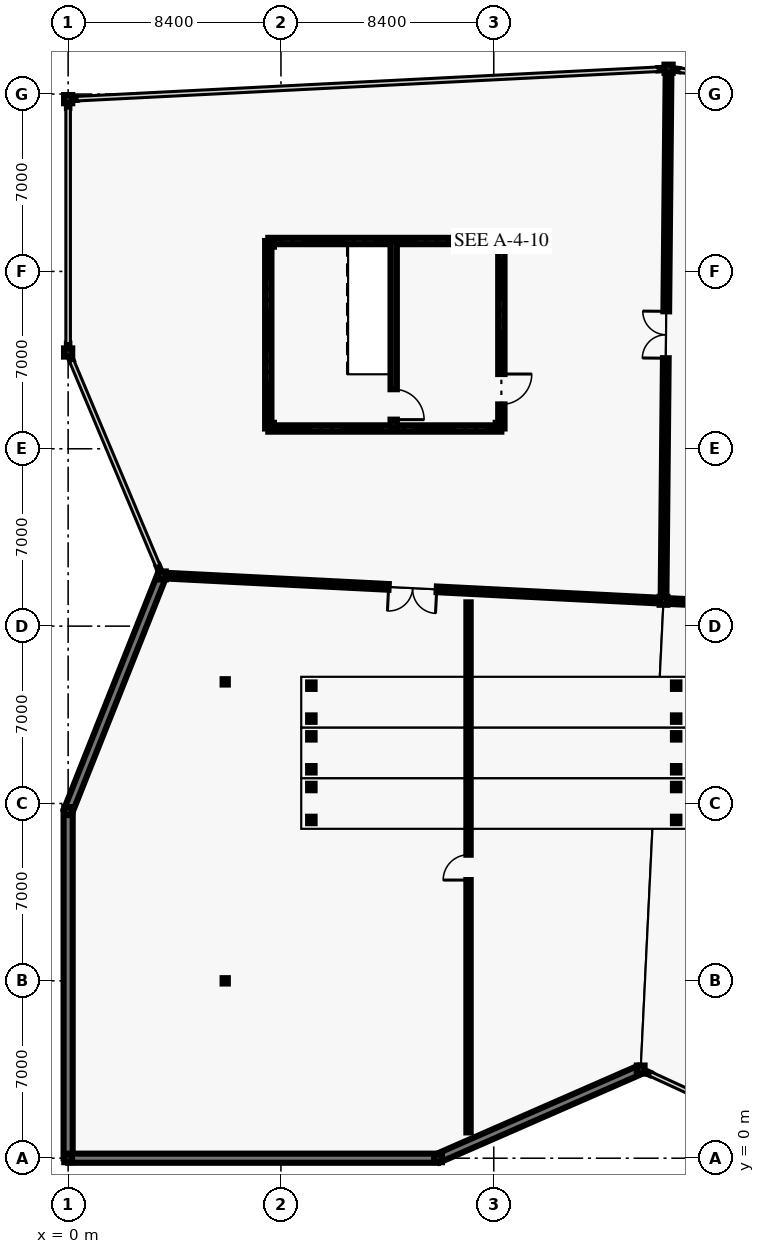
"""IFC4 building model, lengths in metres.
Left out: names, types, materials, properties, quantities, classifications, styles, units other than length and angle.
Written with IfcOpenShell. Run it as: python <this file> out.ifc"""

import sys

from ifc_helpers import new_model, si_unit, direction, frame, frame_2d, origin, origin_2d, place, context, subcontext, project, spatial, rectangle, hollow_circle, i_section, extrude, element, fill, save


model = new_model("IFC4")
c1 = context("Model", 3, precision=1e-05, world=origin(), true_north=direction((0.0, 1.0)))
c2 = subcontext(c1, "Body", "Model", "MODEL_VIEW")
j1 = project(units=[si_unit("LENGTHUNIT", "METRE"), si_unit("PLANEANGLEUNIT", "RADIAN")], contexts=[c1])
p1 = place(None, origin())
s1 = spatial("IfcSite", under=j1, at=p1, CompositionType="ELEMENT")
p2 = place(p1, origin())
s2 = spatial("IfcBuilding", under=s1, at=p2, CompositionType="ELEMENT")
p3 = place(p2, frame((0.0, 0.0, 5.4)))
s3 = spatial("IfcBuildingStorey", under=s2, at=p3, CompositionType="ELEMENT", Elevation=5.4)
for number, where, z_axis, x_axis in (
    (1, (0.0, 0.0, 0.0), (0.0, 0.0, 1.0), (1.0, 0.0, 0.0)),
    (2, (0.0, 13.7, 0.0), (0.0, 0.0, 1.0), (1.0, 0.0, 0.0)),
):
    element("IfcColumn", number, at=place(p3, frame(where, z_axis=z_axis, x_axis=x_axis)), inside=s3, PredefinedType="COLUMN", context=c2, shape_type="SweptSolid", body=[
        extrude(i_section(OverallWidth=0.307, OverallDepth=0.315, WebThickness=0.012, FlangeThickness=0.019, FilletRadius=0.017, at=origin_2d()), origin(), (0.0, 0.0, 1.0), 4.8),
    ])
for number, where, z_axis, x_axis in (
    (3, (0.0, 31.8, 0.0), (0.0, 0.0, 1.0), (1.0, 0.0, 0.0)),
    (4, (0.0, 41.8, 0.0), (0.0, 0.0, 1.0), (1.0, 0.0, 0.0)),
):
    element("IfcColumn", number, at=place(p3, frame(where, z_axis=z_axis, x_axis=x_axis)), inside=s3, PredefinedType="COLUMN", context=c2, shape_type="SweptSolid", body=[
        extrude(hollow_circle(Radius=0.162, WallThickness=0.01, at=origin_2d()), origin(), (0.0, 0.0, 1.0), 4.8),
    ])
for number, where, z_axis, x_axis in (
    (5, (3.7, 23.0, 0.0), (0.0, 0.0, 1.0), (1.0, 0.0, 0.0)),
    (6, (14.6, 0.0, 0.0), (0.0, 0.0, 1.0), (1.0, 0.0, 0.0)),
    (7, (22.6, 3.5, 0.0), (0.0, 0.0, 1.0), (1.0, 0.0, 0.0)),
    (8, (23.5, 22.0, 0.0), (0.0, 0.0, 1.0), (1.0, 0.0, 0.0)),
):
    element("IfcColumn", number, at=place(p3, frame(where, z_axis=z_axis, x_axis=x_axis)), inside=s3, PredefinedType="COLUMN", context=c2, shape_type="SweptSolid", body=[
        extrude(i_section(OverallWidth=0.307, OverallDepth=0.315, WebThickness=0.012, FlangeThickness=0.019, FilletRadius=0.017, at=origin_2d()), origin(), (0.0, 0.0, 1.0), 4.8),
    ])
p4 = place(p3, frame((23.7, 43.0, 0.0), z_axis=(0.0, 0.0, 1.0), x_axis=(1.0, 0.0, 0.0)))
e9 = element("IfcColumn", 9, at=p4, inside=s3, PredefinedType="COLUMN", context=c2, shape_type="SweptSolid", body=[
    extrude(hollow_circle(Radius=0.162, WallThickness=0.01, at=origin_2d()), origin(), (0.0, 0.0, 1.0), 4.8),
])
for number, where, z_axis, x_axis in (
    (10, (8.02, 28.92, 0.0), (0.0, 0.0, 1.0), (1.0, 0.0, 0.0)),
    (11, (16.98, 28.92, 0.0), (0.0, 0.0, 1.0), (1.0, 0.0, 0.0)),
    (12, (16.98, 36.08, 0.0), (0.0, 0.0, 1.0), (1.0, 0.0, 0.0)),
    (13, (8.02, 36.08, 0.0), (0.0, 0.0, 1.0), (1.0, 0.0, 0.0)),
    (14, (6.2, 7.0, 0.0), (0.0, 0.0, 1.0), (1.0, 0.0, 0.0)),
    (15, (6.2, 18.8, 0.0), (0.0, 0.0, 1.0), (1.0, 0.0, 0.0)),
):
    element("IfcColumn", number, at=place(p3, frame(where, z_axis=z_axis, x_axis=x_axis)), inside=s3, PredefinedType="COLUMN", context=c2, shape_type="SweptSolid", body=[
        extrude(i_section(OverallWidth=0.205, OverallDepth=0.21, WebThickness=0.009, FlangeThickness=0.014, FilletRadius=0.01, at=origin_2d()), origin(), (0.0, 0.0, 1.0), 4.8),
    ])
for number, where, z_axis, x_axis in (
    (16, (9.6, 13.35, 0.0), (0.0, 0.0, 1.0), (1.0, 0.0, 0.0)),
    (17, (9.6, 14.65, 0.0), (0.0, 0.0, 1.0), (1.0, 0.0, 0.0)),
    (18, (24.0, 13.35, 0.0), (0.0, 0.0, 1.0), (1.0, 0.0, 0.0)),
    (19, (24.0, 14.65, 0.0), (0.0, 0.0, 1.0), (1.0, 0.0, 0.0)),
):
    element("IfcColumn", number, at=place(p3, frame(where, z_axis=z_axis, x_axis=x_axis)), inside=s3, PredefinedType="COLUMN", context=c2, shape_type="SweptSolid", body=[
        extrude(i_section(OverallWidth=0.254, OverallDepth=0.254, WebThickness=0.009, FlangeThickness=0.014, FilletRadius=0.013, at=origin_2d()), origin(), (0.0, 0.0, 1.0), 0.295),
    ])
for number, where, z_axis, x_axis in (
    (20, (9.6, 15.35, 0.0), (0.0, 0.0, 1.0), (1.0, 0.0, 0.0)),
    (21, (9.6, 16.65, 0.0), (0.0, 0.0, 1.0), (1.0, 0.0, 0.0)),
    (22, (24.0, 15.35, 0.0), (0.0, 0.0, 1.0), (1.0, 0.0, 0.0)),
    (23, (24.0, 16.65, 0.0), (0.0, 0.0, 1.0), (1.0, 0.0, 0.0)),
):
    element("IfcColumn", number, at=place(p3, frame(where, z_axis=z_axis, x_axis=x_axis)), inside=s3, PredefinedType="COLUMN", context=c2, shape_type="SweptSolid", body=[
        extrude(i_section(OverallWidth=0.254, OverallDepth=0.254, WebThickness=0.009, FlangeThickness=0.014, FilletRadius=0.013, at=origin_2d()), origin(), (0.0, 0.0, 1.0), 0.745),
    ])
for number, where, z_axis, x_axis in (
    (24, (9.6, 17.35, 0.0), (0.0, 0.0, 1.0), (1.0, 0.0, 0.0)),
    (25, (9.6, 18.65, 0.0), (0.0, 0.0, 1.0), (1.0, 0.0, 0.0)),
    (26, (24.0, 17.35, 0.0), (0.0, 0.0, 1.0), (1.0, 0.0, 0.0)),
    (27, (24.0, 18.65, 0.0), (0.0, 0.0, 1.0), (1.0, 0.0, 0.0)),
):
    element("IfcColumn", number, at=place(p3, frame(where, z_axis=z_axis, x_axis=x_axis)), inside=s3, PredefinedType="COLUMN", context=c2, shape_type="SweptSolid", body=[
        extrude(i_section(OverallWidth=0.254, OverallDepth=0.254, WebThickness=0.009, FlangeThickness=0.014, FilletRadius=0.013, at=origin_2d()), origin(), (0.0, 0.0, 1.0), 1.195),
    ])
p5 = place(p3, frame((0.0, 13.7, 0.0), z_axis=(0.0, 0.0, 1.0), x_axis=(0.36968498985, 0.929157149399, 0.0)))
e28 = element("IfcWall", 28, at=p5, inside=s3, PredefinedType="SOLIDWALL", context=c2, shape_type="SweptSolid", body=[
    extrude(rectangle(XDim=9.949, YDim=0.36, at=frame_2d((4.975, 0.0))), origin(), (0.0, 0.0, 1.0), 3.62),
])
p6 = place(p3, frame((0.0, 0.0, 0.0), z_axis=(0.0, 0.0, 1.0), x_axis=(0.0, 1.0, 0.0)))
e29 = element("IfcWall", 29, at=p6, inside=s3, PredefinedType="SOLIDWALL", context=c2, shape_type="SweptSolid", body=[
    extrude(rectangle(XDim=13.7, YDim=0.36, at=frame_2d((6.85, 0.0))), origin(), (0.0, 0.0, 1.0), 3.62),
])
p7 = place(p3, frame((14.6, 0.0, 0.0), z_axis=(0.0, 0.0, 1.0), x_axis=(-1.0, 0.0, 0.0)))
e30 = element("IfcWall", 30, at=p7, inside=s3, PredefinedType="SOLIDWALL", context=c2, shape_type="SweptSolid", body=[
    extrude(rectangle(XDim=14.6, YDim=0.36, at=frame_2d((7.3, 0.0))), origin(), (0.0, 0.0, 1.0), 3.62),
])
p8 = place(p3, frame((22.545, 3.476, 0.0), z_axis=(0.0, 0.0, 1.0), x_axis=(-0.916148288852, -0.400839510069, 0.0)))
e31 = element("IfcWall", 31, at=p8, inside=s3, PredefinedType="SOLIDWALL", context=c2, shape_type="SweptSolid", body=[
    extrude(rectangle(XDim=8.672, YDim=0.36, at=frame_2d((4.336, 0.0))), origin(), (0.0, 0.0, 1.0), 3.62),
])
p9 = place(p3, frame((22.972, 3.329, 0.0), z_axis=(0.0, 0.0, 1.0), x_axis=(-0.9095772547, 0.415534857422, 0.0)))
e32 = element("IfcWall", 32, at=p9, inside=s3, PredefinedType="SOLIDWALL", context=c2, shape_type="SweptSolid", body=[
    extrude(rectangle(XDim=0.308, YDim=0.095, at=frame_2d((0.154, 0.0))), origin(), (0.0, 0.0, 1.0), 3.62),
])
p10 = place(p3, frame((0.042, 41.802, 0.0), z_axis=(0.0, 0.0, 1.0), x_axis=(0.998635261606, 0.052226566772, 0.0)))
e33 = element("IfcWall", 33, at=p10, inside=s3, PredefinedType="SOLIDWALL", context=c2, shape_type="SweptSolid", body=[
    extrude(rectangle(XDim=0.309, YDim=0.095, at=frame_2d((0.154, 0.0))), origin(), (0.0, 0.0, 1.0), 3.62),
])
p11 = place(p3, frame((23.29, 42.979, 0.0), z_axis=(0.0, 0.0, 1.0), x_axis=(0.998633100652, 0.052267870454, 0.0)))
e34 = element("IfcWall", 34, at=p11, inside=s3, PredefinedType="SOLIDWALL", context=c2, shape_type="SweptSolid", body=[
    extrude(rectangle(XDim=0.308, YDim=0.095, at=frame_2d((0.154, 0.0))), origin(), (0.0, 0.0, 1.0), 3.62),
])
p12 = place(p3, frame((0.0, 31.842, 0.0), z_axis=(0.0, 0.0, 1.0), x_axis=(0.0, 1.0, 0.0)))
e35 = element("IfcWall", 35, at=p12, inside=s3, PredefinedType="SOLIDWALL", context=c2, shape_type="SweptSolid", body=[
    extrude(rectangle(XDim=0.308, YDim=0.095, at=frame_2d((0.154, 0.0))), origin(), (0.0, 0.0, 1.0), 3.62),
])
for number, where, z_axis, x_axis in (
    (36, (0.0, 41.45, 0.0), (0.0, 0.0, 1.0), (0.0, 1.0, 0.0)),
    (37, (3.661, 23.094, 0.0), (0.0, 0.0, 1.0), (-0.389, 0.921, 0.0)),
    (38, (0.136, 31.477, 0.0), (0.0, 0.0, 1.0), (-0.389, 0.921, 0.0)),
):
    element("IfcWall", number, at=place(p3, frame(where, z_axis=z_axis, x_axis=x_axis)), inside=s3, PredefinedType="SOLIDWALL", context=c2, shape_type="SweptSolid", body=[
        extrude(rectangle(XDim=0.308, YDim=0.095, at=frame_2d((0.154, 0.0))), origin(), (0.0, 0.0, 1.0), 3.62),
    ])
p13 = place(p3, frame((23.802, 42.986, 0.0), z_axis=(0.0, 0.0, 1.0), x_axis=(0.991074779294, -0.133307096014, 0.0)))
e39 = element("IfcWall", 39, at=p13, inside=s3, PredefinedType="SOLIDWALL", context=c2, shape_type="SweptSolid", body=[
    extrude(rectangle(XDim=0.308, YDim=0.095, at=frame_2d((0.154, 0.0))), origin(), (0.0, 0.0, 1.0), 3.62),
])
p14 = place(p3, frame((23.5, 22.0, 0.0), z_axis=(0.0, 0.0, 1.0), x_axis=(-0.99872706092, 0.050440636263, 0.0)))
e40 = element("IfcWall", 40, at=p14, inside=s3, PredefinedType="SOLIDWALL", context=c2, shape_type="SweptSolid", body=[
    extrude(rectangle(XDim=19.825, YDim=0.225, at=frame_2d((9.913, 0.0))), origin(), (0.0, 0.0, 1.0), 4.02),
])
p15 = place(p14, frame((8.963, 0.0, 0.0)))
e41 = element("IfcOpeningElement", 41, at=p15, cuts=e40, PredefinedType="OPENING", context=c2, shape_type="SweptSolid", body=[
    extrude(rectangle(XDim=1.9, YDim=2.35, at=frame_2d((0.95, 1.175))), frame((0.0, 0.123, 0.0), z_axis=(0.0, -1.0, 0.0), x_axis=(1.0, 0.0, 0.0)), (0.0, 0.0, 1.0), 0.245),
])
p16 = place(p3, frame((43.8, 21.0, 0.0), z_axis=(0.0, 0.0, 1.0), x_axis=(-0.998788882418, 0.049201304434, 0.0)))
e42 = element("IfcWall", 42, at=p16, inside=s3, PredefinedType="SOLIDWALL", context=c2, shape_type="SweptSolid", body=[
    extrude(rectangle(XDim=20.325, YDim=0.225, at=frame_2d((10.162, 0.0))), origin(), (0.0, 0.0, 1.0), 4.02),
])
p17 = place(p16, frame((9.212, 0.0, 0.0)))
e43 = element("IfcOpeningElement", 43, at=p17, cuts=e42, PredefinedType="OPENING", context=c2, shape_type="SweptSolid", body=[
    extrude(rectangle(XDim=1.9, YDim=2.35, at=frame_2d((0.95, 1.175))), frame((0.0, 0.123, 0.0), z_axis=(0.0, -1.0, 0.0), x_axis=(1.0, 0.0, 0.0)), (0.0, 0.0, 1.0), 0.245),
])
p18 = place(p3, frame((23.5, 22.0, 0.0), z_axis=(0.0, 0.0, 1.0), x_axis=(0.009521052802, 0.99995467375, 0.0)))
e44 = element("IfcWall", 44, at=p18, inside=s3, PredefinedType="SOLIDWALL", context=c2, shape_type="SweptSolid", body=[
    extrude(rectangle(XDim=21.001, YDim=0.225, at=frame_2d((10.5, 0.0))), origin(), (0.0, 0.0, 1.0), 4.02),
])
p19 = place(p18, frame((9.575, 0.0, 0.0)))
e45 = element("IfcOpeningElement", 45, at=p19, cuts=e44, PredefinedType="OPENING", context=c2, shape_type="SweptSolid", body=[
    extrude(rectangle(XDim=1.85, YDim=2.4, at=frame_2d((0.925, 1.2))), frame((0.0, 0.123, 0.0), z_axis=(0.0, -1.0, 0.0), x_axis=(1.0, 0.0, 0.0)), (0.0, 0.0, 1.0), 0.245),
])
p20 = place(p3, frame((15.804, 1.018, 0.0), z_axis=(0.0, 0.0, 1.0), x_axis=(0.0, 1.0, 0.0)))
e46 = element("IfcWall", 46, at=p20, inside=s3, PredefinedType="PARTITIONING", context=c2, shape_type="SweptSolid", body=[
    extrude(rectangle(XDim=20.92, YDim=0.17, at=frame_2d((10.46, 0.0))), origin(), (0.0, 0.0, 1.0), 3.32),
])
p21 = place(p20, frame((9.96, 0.0, 0.0)))
e47 = element("IfcOpeningElement", 47, at=p21, cuts=e46, PredefinedType="OPENING", context=c2, shape_type="SweptSolid", body=[
    extrude(rectangle(XDim=1.0, YDim=2.15, at=frame_2d((0.5, 1.075))), frame((0.0, 0.095, 0.0), z_axis=(0.0, -1.0, 0.0), x_axis=(1.0, 0.0, 0.0)), (0.0, 0.0, 1.0), 0.19),
])
p22 = place(p3, frame((7.9, 28.8, 0.0), z_axis=(0.0, 0.0, 1.0), x_axis=(0.0, 1.0, 0.0)))
e48 = element("IfcWall", 48, at=p22, inside=s3, PredefinedType="SHEAR", context=c2, shape_type="SweptSolid", body=[
    extrude(rectangle(XDim=7.4, YDim=0.25, at=frame_2d((3.7, 0.0))), origin(), (0.0, 0.0, 1.0), 4.56),
])
for number, where, z_axis, x_axis in (
    (49, (7.9, 36.2, 0.0), (0.0, 0.0, 1.0), (1.0, 0.0, 0.0)),
    (50, (17.1, 28.8, 0.0), (0.0, 0.0, 1.0), (-1.0, 0.0, 0.0)),
):
    element("IfcWall", number, at=place(p3, frame(where, z_axis=z_axis, x_axis=x_axis)), inside=s3, PredefinedType="SHEAR", context=c2, shape_type="SweptSolid", body=[
        extrude(rectangle(XDim=9.2, YDim=0.25, at=frame_2d((4.6, 0.0))), origin(), (0.0, 0.0, 1.0), 4.56),
    ])
p23 = place(p3, frame((17.1, 36.2, 0.0), z_axis=(0.0, 0.0, 1.0), x_axis=(0.0, -1.0, 0.0)))
e51 = element("IfcWall", 51, at=p23, inside=s3, PredefinedType="SHEAR", context=c2, shape_type="SweptSolid", body=[
    extrude(rectangle(XDim=7.4, YDim=0.25, at=frame_2d((3.7, 0.0))), origin(), (0.0, 0.0, 1.0), 4.56),
])
p24 = place(p23, frame((5.25, 0.0, 0.0)))
e52 = element("IfcOpeningElement", 52, at=p24, cuts=e51, PredefinedType="OPENING", context=c2, shape_type="SweptSolid", body=[
    extrude(rectangle(XDim=1.2, YDim=2.2, at=frame_2d((0.6, 1.1))), frame((0.0, 0.135, 0.0), z_axis=(0.0, -1.0, 0.0), x_axis=(1.0, 0.0, 0.0)), (0.0, 0.0, 1.0), 0.27),
])
p25 = place(p3, frame((12.85, 36.2, 0.0), z_axis=(0.0, 0.0, 1.0), x_axis=(0.0, -1.0, 0.0)))
e53 = element("IfcWall", 53, at=p25, inside=s3, PredefinedType="SHEAR", context=c2, shape_type="SweptSolid", body=[
    extrude(rectangle(XDim=7.4, YDim=0.25, at=frame_2d((3.7, 0.0))), origin(), (0.0, 0.0, 1.0), 4.56),
])
p26 = place(p25, frame((5.85, 0.0, 0.0)))
e54 = element("IfcOpeningElement", 54, at=p26, cuts=e53, PredefinedType="OPENING", context=c2, shape_type="SweptSolid", body=[
    extrude(rectangle(XDim=1.2, YDim=2.2, at=frame_2d((0.6, 1.1))), frame((0.0, 0.135, 0.0), z_axis=(0.0, -1.0, 0.0), x_axis=(1.0, 0.0, 0.0)), (0.0, 0.0, 1.0), 0.27),
])
p27 = place(p15, origin())
e55 = element("IfcDoor", 55, at=p27, inside=s3, OperationType="DOUBLE_DOOR_SINGLE_SWING", PredefinedType="DOOR", context=c2, shape_type="SweptSolid", body=[
    extrude(rectangle(XDim=1.9, YDim=2.35, at=frame_2d((0.95, 1.175))), frame((0.0, 0.025, 0.0), z_axis=(0.0, -1.0, 0.0), x_axis=(1.0, 0.0, 0.0)), (0.0, 0.0, 1.0), 0.05),
])
fill(e41, e55)
p28 = place(p19, origin())
e56 = element("IfcDoor", 56, at=p28, inside=s3, OperationType="DOUBLE_DOOR_SINGLE_SWING", PredefinedType="DOOR", context=c2, shape_type="SweptSolid", body=[
    extrude(rectangle(XDim=1.85, YDim=2.4, at=frame_2d((0.925, 1.2))), frame((0.0, 0.025, 0.0), z_axis=(0.0, -1.0, 0.0), x_axis=(1.0, 0.0, 0.0)), (0.0, 0.0, 1.0), 0.05),
])
fill(e45, e56)
p29 = place(p21, origin())
e57 = element("IfcDoor", 57, at=p29, inside=s3, OperationType="SINGLE_SWING_LEFT", PredefinedType="DOOR", context=c2, shape_type="SweptSolid", body=[
    extrude(rectangle(XDim=1.0, YDim=2.15, at=frame_2d((0.5, 1.075))), frame((0.0, 0.025, 0.0), z_axis=(0.0, -1.0, 0.0), x_axis=(1.0, 0.0, 0.0)), (0.0, 0.0, 1.0), 0.05),
])
fill(e47, e57)
p30 = place(p24, origin())
e58 = element("IfcDoor", 58, at=p30, inside=s3, OperationType="SINGLE_SWING_LEFT", PredefinedType="DOOR", context=c2, shape_type="SweptSolid", body=[
    extrude(rectangle(XDim=1.2, YDim=2.2, at=frame_2d((0.6, 1.1))), frame((0.0, 0.025, 0.0), z_axis=(0.0, -1.0, 0.0), x_axis=(1.0, 0.0, 0.0)), (0.0, 0.0, 1.0), 0.05),
])
fill(e52, e58)
p31 = place(p26, origin())
e59 = element("IfcDoor", 59, at=p31, inside=s3, OperationType="SINGLE_SWING_RIGHT", PredefinedType="DOOR", context=c2, shape_type="SweptSolid", body=[
    extrude(rectangle(XDim=1.2, YDim=2.2, at=frame_2d((0.6, 1.1))), frame((0.0, 0.025, 0.0), z_axis=(0.0, -1.0, 0.0), x_axis=(1.0, 0.0, 0.0)), (0.0, 0.0, 1.0), 0.05),
])
fill(e54, e59)
save(model, sys.argv[1])
